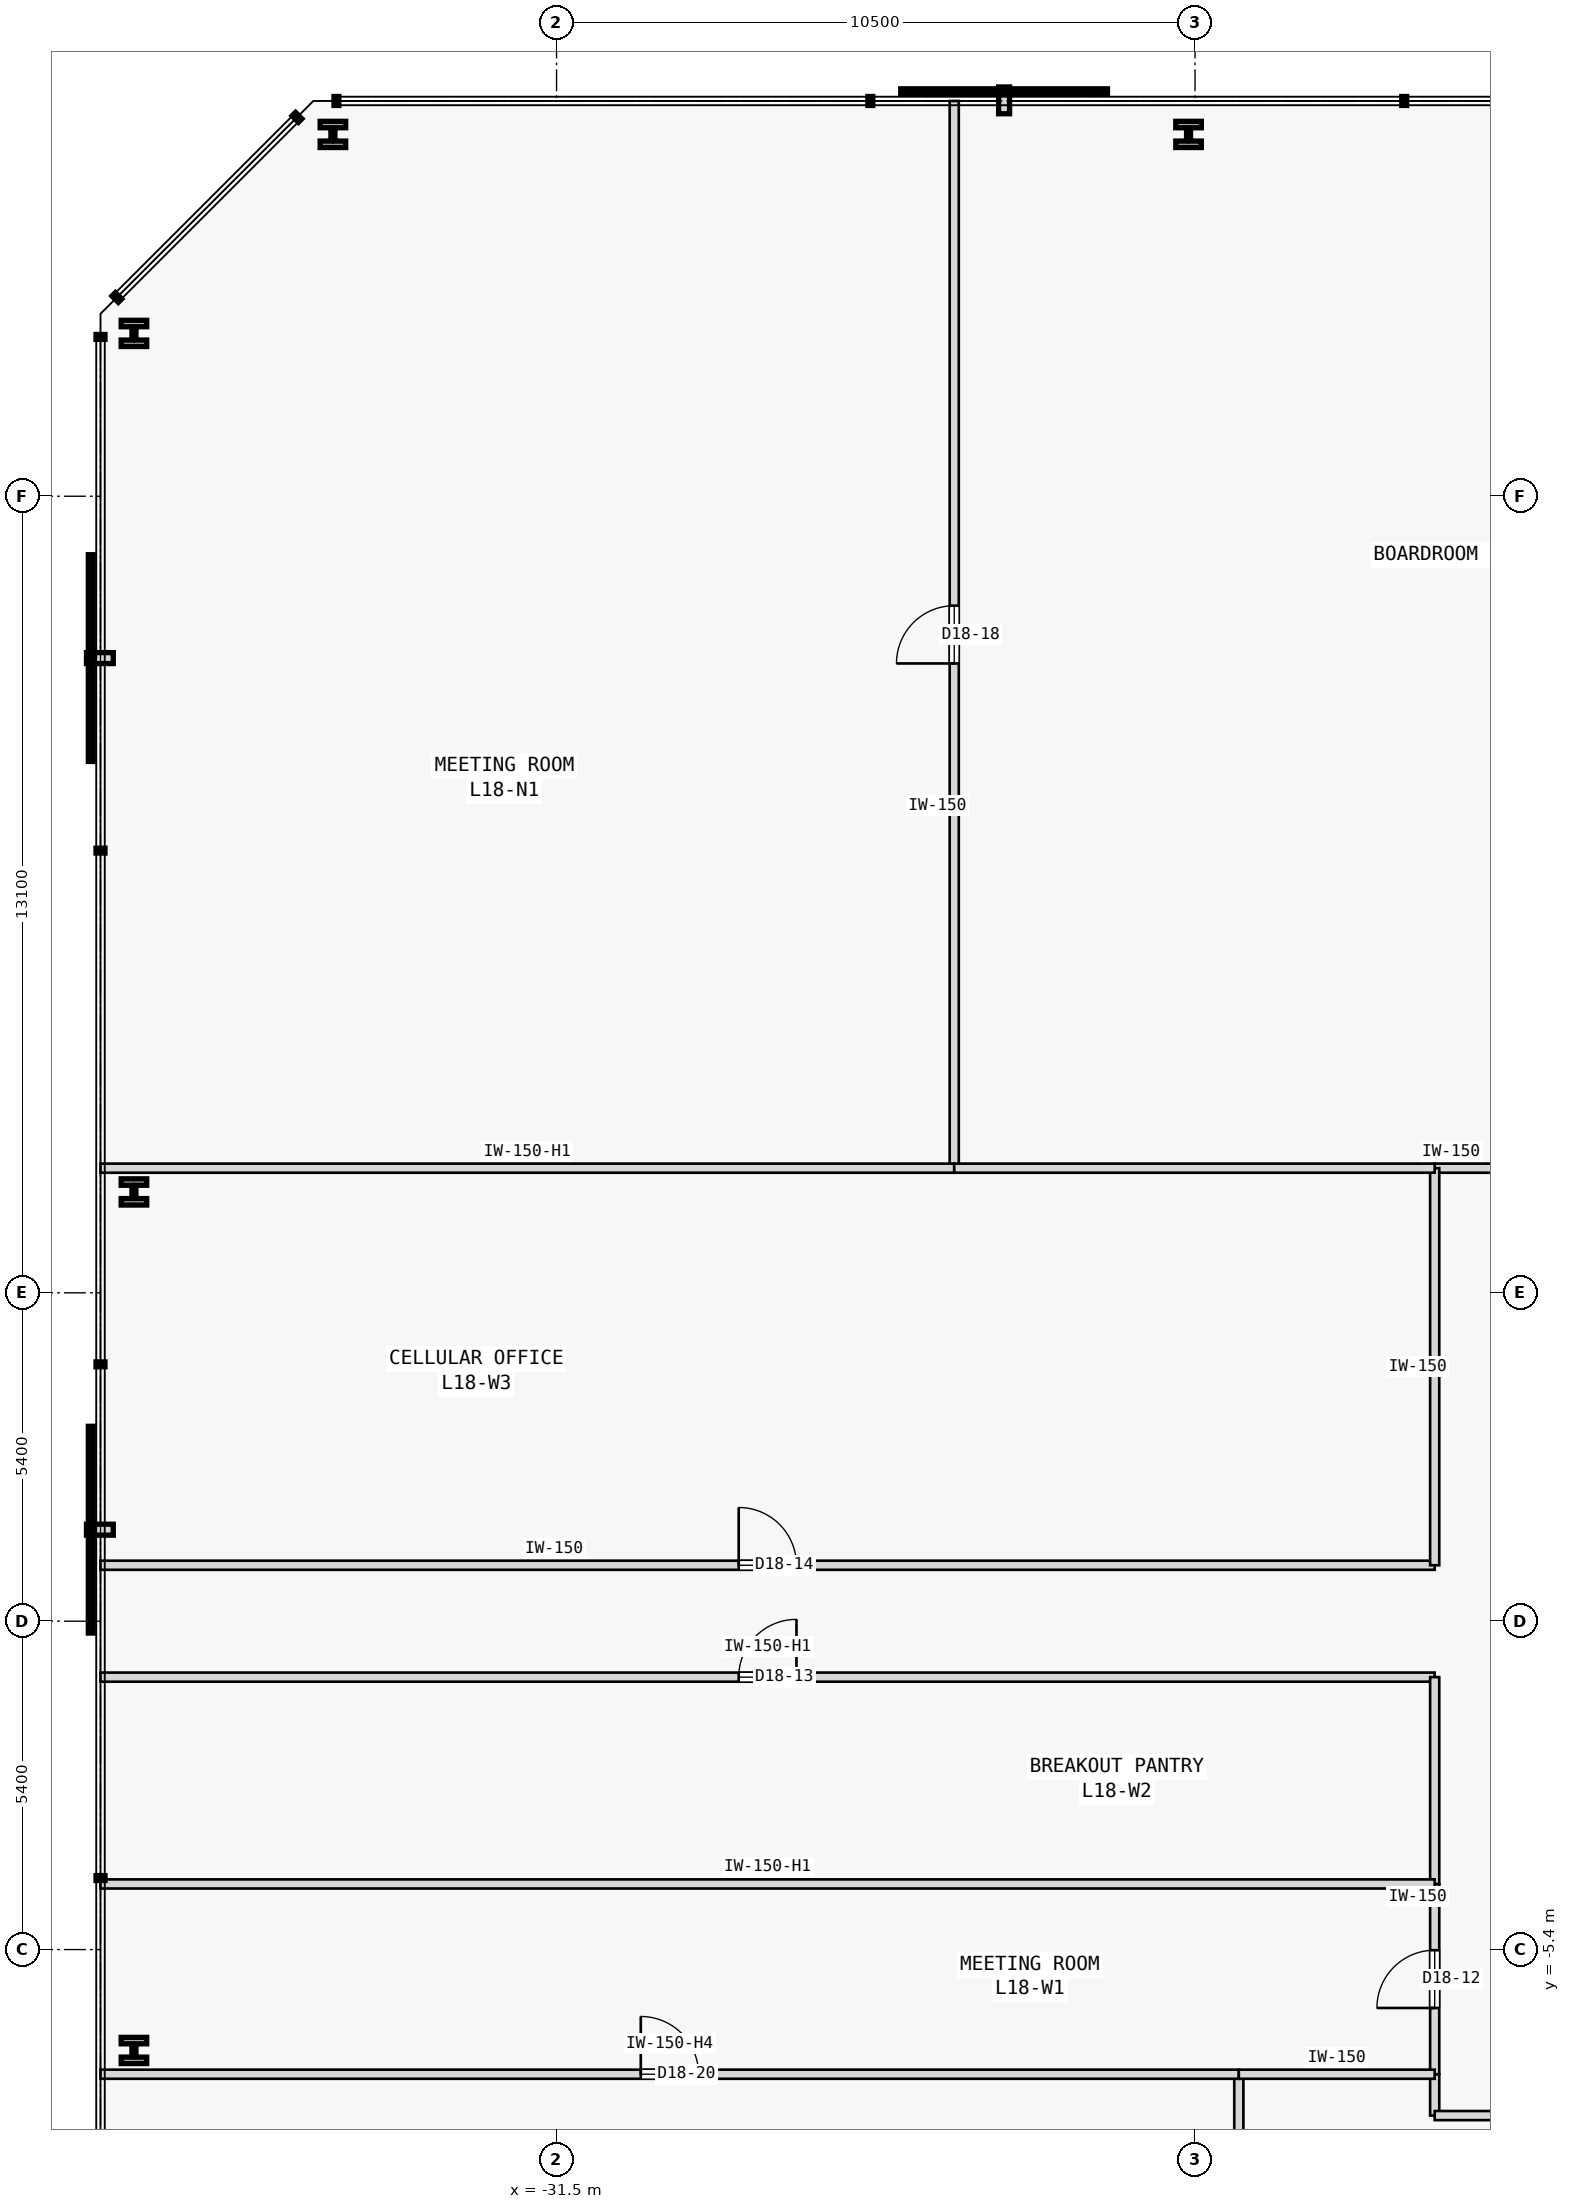
"""IFC4 building model, lengths in metres.
Left out: names, types, materials, properties, quantities, classifications, styles, units other than length and angle.
Written with IfcOpenShell. Run it as: python <this file> out.ifc"""

import sys

from ifc_helpers import new_model, si_unit, direction, frame, frame_2d, origin, origin_2d, place, context, subcontext, project, spatial, rectangle, i_section, extrude, element, fill, save


model = new_model("IFC4")
c1 = context("Model", 3, precision=1e-05, world=origin(), true_north=direction((0.0, 1.0)))
c2 = subcontext(c1, "Body", "Model", "MODEL_VIEW")
j1 = project(units=[si_unit("LENGTHUNIT", "METRE"), si_unit("PLANEANGLEUNIT", "RADIAN")], contexts=[c1])
p1 = place(None, origin())
s1 = spatial("IfcSite", under=j1, at=p1, CompositionType="ELEMENT")
p2 = place(p1, origin())
s2 = spatial("IfcBuilding", under=s1, at=p2, CompositionType="ELEMENT")
p3 = place(p2, frame((0.0, 0.0, 75.0)))
s3 = spatial("IfcBuildingStorey", under=s2, at=p3, CompositionType="ELEMENT", Elevation=75.0)
for number, where, z_axis, x_axis in (
    (1, (-21.107, 24.45, 0.0), (0.0, 0.0, 1.0), (1.0, 0.0, 0.0)),
    (2, (-35.178, 24.45, 0.0), (0.0, 0.0, 1.0), (1.0, 0.0, 0.0)),
    (3, (-38.45, 21.178, 0.0), (0.0, 0.0, 1.0), (1.0, 0.0, 0.0)),
    (4, (-38.45, 7.059, 0.0), (0.0, 0.0, 1.0), (1.0, 0.0, 0.0)),
    (5, (-38.45, -7.059, 0.0), (0.0, 0.0, 1.0), (1.0, 0.0, 0.0)),
):
    element("IfcColumn", number, at=place(p3, frame(where, z_axis=z_axis, x_axis=x_axis)), inside=s3, PredefinedType="COLUMN", context=c2, shape_type="SweptSolid", body=[
        extrude(i_section(OverallWidth=0.42, OverallDepth=0.431, WebThickness=0.065, FlangeThickness=0.106, FilletRadius=0.015, at=origin_2d()), origin(), (0.0, 0.0, 1.0), 3.8),
    ])
p4 = place(p3, frame((-17.059, 7.45, 0.0), z_axis=(0.0, 0.0, 1.0), x_axis=(1.0, 0.0, 0.0)))
e6 = element("IfcWall", 6, at=p4, inside=s3, PredefinedType="PARTITIONING", context=c2, shape_type="SweptSolid", body=[
    extrude(rectangle(XDim=7.699, YDim=0.15, at=frame_2d((3.85, 0.0))), origin(), (0.0, 0.0, 1.0), 3.4),
])
p5 = place(p4, frame((3.375, 0.0, 0.0)))
e7 = element("IfcOpeningElement", 7, at=p5, cuts=e6, PredefinedType="OPENING", context=c2, shape_type="SweptSolid", body=[
    extrude(rectangle(XDim=0.95, YDim=2.15, at=frame_2d((0.475, 1.075))), frame((0.0, 0.085, 0.0), z_axis=(0.0, -1.0, 0.0), x_axis=(1.0, 0.0, 0.0)), (0.0, 0.0, 1.0), 0.17),
])
p6 = place(p3, frame((-17.059, -8.13, 0.0), z_axis=(0.0, 0.0, 1.0), x_axis=(0.0, 1.0, 0.0)))
e8 = element("IfcWall", 8, at=p6, inside=s3, PredefinedType="PARTITIONING", context=c2, shape_type="SweptSolid", body=[
    extrude(rectangle(XDim=0.68, YDim=0.15, at=frame_2d((0.34, 0.0))), origin(), (0.0, 0.0, 1.0), 3.4),
])
p7 = place(p3, frame((-17.059, -8.13, 0.0), z_axis=(0.0, 0.0, 1.0), x_axis=(1.0, 0.0, 0.0)))
e9 = element("IfcWall", 9, at=p7, inside=s3, PredefinedType="PARTITIONING", context=c2, shape_type="SweptSolid", body=[
    extrude(rectangle(XDim=16.139, YDim=0.15, at=frame_2d((8.07, 0.0))), origin(), (0.0, 0.0, 1.0), 3.4),
])
p8 = place(p3, frame((-17.059, -7.45, 0.0), z_axis=(0.0, 0.0, 1.0), x_axis=(0.0, 1.0, 0.0)))
e10 = element("IfcWall", 10, at=p8, inside=s3, PredefinedType="PARTITIONING", context=c2, shape_type="SweptSolid", body=[
    extrude(rectangle(XDim=3.129, YDim=0.15, at=frame_2d((1.564, 0.0))), origin(), (0.0, 0.0, 1.0), 3.4),
])
p9 = place(p8, frame((1.09, 0.0, 0.0)))
e11 = element("IfcOpeningElement", 11, at=p9, cuts=e10, PredefinedType="OPENING", context=c2, shape_type="SweptSolid", body=[
    extrude(rectangle(XDim=0.95, YDim=2.15, at=frame_2d((0.475, 1.075))), frame((0.0, 0.085, 0.0), z_axis=(0.0, -1.0, 0.0), x_axis=(1.0, 0.0, 0.0)), (0.0, 0.0, 1.0), 0.17),
])
p10 = place(p3, frame((-39.0, -0.92, 0.0), z_axis=(0.0, 0.0, 1.0), x_axis=(1.0, 0.0, 0.0)))
e12 = element("IfcWall", 12, at=p10, inside=s3, PredefinedType="PARTITIONING", context=c2, shape_type="SweptSolid", body=[
    extrude(rectangle(XDim=21.941, YDim=0.15, at=frame_2d((10.97, 0.0))), origin(), (0.0, 0.0, 1.0), 2.95),
])
p11 = place(p10, frame((10.496, 0.0, 0.0)))
e13 = element("IfcOpeningElement", 13, at=p11, cuts=e12, PredefinedType="OPENING", context=c2, shape_type="SweptSolid", body=[
    extrude(rectangle(XDim=0.95, YDim=2.15, at=frame_2d((0.475, 1.075))), frame((0.0, 0.085, 0.0), z_axis=(0.0, -1.0, 0.0), x_axis=(1.0, 0.0, 0.0)), (0.0, 0.0, 1.0), 0.17),
])
p12 = place(p3, frame((-17.059, -4.321, 0.0), z_axis=(0.0, 0.0, 1.0), x_axis=(0.0, 1.0, 0.0)))
e14 = element("IfcWall", 14, at=p12, inside=s3, PredefinedType="PARTITIONING", context=c2, shape_type="SweptSolid", body=[
    extrude(rectangle(XDim=3.401, YDim=0.15, at=frame_2d((1.701, 0.0))), origin(), (0.0, 0.0, 1.0), 3.4),
])
p13 = place(p3, frame((-39.0, 0.92, 0.0), z_axis=(0.0, 0.0, 1.0), x_axis=(1.0, 0.0, 0.0)))
e15 = element("IfcWall", 15, at=p13, inside=s3, PredefinedType="PARTITIONING", context=c2, shape_type="SweptSolid", body=[
    extrude(rectangle(XDim=21.941, YDim=0.15, at=frame_2d((10.97, 0.0))), origin(), (0.0, 0.0, 1.0), 3.4),
])
p14 = place(p13, frame((10.496, 0.0, 0.0)))
e16 = element("IfcOpeningElement", 16, at=p14, cuts=e15, PredefinedType="OPENING", context=c2, shape_type="SweptSolid", body=[
    extrude(rectangle(XDim=0.95, YDim=2.15, at=frame_2d((0.475, 1.075))), frame((0.0, 0.085, 0.0), z_axis=(0.0, -1.0, 0.0), x_axis=(1.0, 0.0, 0.0)), (0.0, 0.0, 1.0), 0.17),
])
p15 = place(p3, frame((-17.059, 0.92, 0.0), z_axis=(0.0, 0.0, 1.0), x_axis=(0.0, 1.0, 0.0)))
e17 = element("IfcWall", 17, at=p15, inside=s3, PredefinedType="PARTITIONING", context=c2, shape_type="SweptSolid", body=[
    extrude(rectangle(XDim=6.53, YDim=0.15, at=frame_2d((3.265, 0.0))), origin(), (0.0, 0.0, 1.0), 3.4),
])
p16 = place(p3, frame((-24.96, 7.45, 0.0), z_axis=(0.0, 0.0, 1.0), x_axis=(0.0, 1.0, 0.0)))
e18 = element("IfcWall", 18, at=p16, inside=s3, PredefinedType="PARTITIONING", context=c2, shape_type="SweptSolid", body=[
    extrude(rectangle(XDim=17.55, YDim=0.15, at=frame_2d((8.775, 0.0))), origin(), (0.0, 0.0, 1.0), 3.4),
])
p17 = place(p16, frame((8.3, 0.0, 0.0)))
e19 = element("IfcOpeningElement", 19, at=p17, cuts=e18, PredefinedType="OPENING", context=c2, shape_type="SweptSolid", body=[
    extrude(rectangle(XDim=0.95, YDim=2.15, at=frame_2d((0.475, 1.075))), frame((0.0, 0.085, 0.0), z_axis=(0.0, -1.0, 0.0), x_axis=(1.0, 0.0, 0.0)), (0.0, 0.0, 1.0), 0.17),
])
p18 = place(p3, frame((-39.0, 7.45, 0.0), z_axis=(0.0, 0.0, 1.0), x_axis=(1.0, 0.0, 0.0)))
e20 = element("IfcWall", 20, at=p18, inside=s3, PredefinedType="PARTITIONING", context=c2, shape_type="SweptSolid", body=[
    extrude(rectangle(XDim=14.04, YDim=0.15, at=frame_2d((7.02, 0.0))), origin(), (0.0, 0.0, 1.0), 2.95),
])
p19 = place(p3, frame((-24.96, 7.45, 0.0), z_axis=(0.0, 0.0, 1.0), x_axis=(1.0, 0.0, 0.0)))
e21 = element("IfcWall", 21, at=p19, inside=s3, PredefinedType="PARTITIONING", context=c2, shape_type="SweptSolid", body=[
    extrude(rectangle(XDim=7.901, YDim=0.15, at=frame_2d((3.95, 0.0))), origin(), (0.0, 0.0, 1.0), 3.4),
])
p20 = place(p3, frame((-20.28, -25.0, 0.0), z_axis=(0.0, 0.0, 1.0), x_axis=(0.0, 1.0, 0.0)))
e22 = element("IfcWall", 22, at=p20, inside=s3, PredefinedType="PARTITIONING", context=c2, shape_type="SweptSolid", body=[
    extrude(rectangle(XDim=17.55, YDim=0.15, at=frame_2d((8.775, 0.0))), origin(), (0.0, 0.0, 1.0), 3.4),
])
p21 = place(p3, frame((-39.0, -7.45, 0.0), z_axis=(0.0, 0.0, 1.0), x_axis=(1.0, 0.0, 0.0)))
e23 = element("IfcWall", 23, at=p21, inside=s3, PredefinedType="PARTITIONING", context=c2, shape_type="SweptSolid", body=[
    extrude(rectangle(XDim=18.72, YDim=0.15, at=frame_2d((9.36, 0.0))), origin(), (0.0, 0.0, 1.0), 2.34),
])
p22 = place(p21, frame((8.885, 0.0, 0.0)))
e24 = element("IfcOpeningElement", 24, at=p22, cuts=e23, PredefinedType="OPENING", context=c2, shape_type="SweptSolid", body=[
    extrude(rectangle(XDim=0.95, YDim=2.15, at=frame_2d((0.475, 1.075))), frame((0.0, 0.085, 0.0), z_axis=(0.0, -1.0, 0.0), x_axis=(1.0, 0.0, 0.0)), (0.0, 0.0, 1.0), 0.17),
])
p23 = place(p3, frame((-20.28, -7.45, 0.0), z_axis=(0.0, 0.0, 1.0), x_axis=(1.0, 0.0, 0.0)))
e25 = element("IfcWall", 25, at=p23, inside=s3, PredefinedType="PARTITIONING", context=c2, shape_type="SweptSolid", body=[
    extrude(rectangle(XDim=3.221, YDim=0.15, at=frame_2d((1.61, 0.0))), origin(), (0.0, 0.0, 1.0), 3.4),
])
p24 = place(p3, frame((-39.0, -4.321, 0.0), z_axis=(0.0, 0.0, 1.0), x_axis=(1.0, 0.0, 0.0)))
e26 = element("IfcWall", 26, at=p24, inside=s3, PredefinedType="PARTITIONING", context=c2, shape_type="SweptSolid", body=[
    extrude(rectangle(XDim=21.941, YDim=0.15, at=frame_2d((10.97, 0.0))), origin(), (0.0, 0.0, 1.0), 2.95),
])
p25 = place(p9, origin())
e27 = element("IfcDoor", 27, at=p25, inside=s3, OperationType="SINGLE_SWING_LEFT", PredefinedType="DOOR", context=c2, shape_type="SweptSolid", body=[
    extrude(rectangle(XDim=0.95, YDim=2.15, at=frame_2d((0.475, 1.075))), frame((0.0, 0.025, 0.0), z_axis=(0.0, -1.0, 0.0), x_axis=(1.0, 0.0, 0.0)), (0.0, 0.0, 1.0), 0.05),
])
fill(e11, e27)
p26 = place(p11, origin())
e28 = element("IfcDoor", 28, at=p26, inside=s3, OperationType="SINGLE_SWING_RIGHT", PredefinedType="DOOR", context=c2, shape_type="SweptSolid", body=[
    extrude(rectangle(XDim=0.95, YDim=2.15, at=frame_2d((0.475, 1.075))), frame((0.0, 0.025, 0.0), z_axis=(0.0, -1.0, 0.0), x_axis=(1.0, 0.0, 0.0)), (0.0, 0.0, 1.0), 0.05),
])
fill(e13, e28)
p27 = place(p14, origin())
e29 = element("IfcDoor", 29, at=p27, inside=s3, OperationType="SINGLE_SWING_LEFT", PredefinedType="DOOR", context=c2, shape_type="SweptSolid", body=[
    extrude(rectangle(XDim=0.95, YDim=2.15, at=frame_2d((0.475, 1.075))), frame((0.0, 0.025, 0.0), z_axis=(0.0, -1.0, 0.0), x_axis=(1.0, 0.0, 0.0)), (0.0, 0.0, 1.0), 0.05),
])
fill(e16, e29)
p28 = place(p17, origin())
e30 = element("IfcDoor", 30, at=p28, inside=s3, OperationType="SINGLE_SWING_LEFT", PredefinedType="DOOR", context=c2, shape_type="SweptSolid", body=[
    extrude(rectangle(XDim=0.95, YDim=2.15, at=frame_2d((0.475, 1.075))), frame((0.0, 0.025, 0.0), z_axis=(0.0, -1.0, 0.0), x_axis=(1.0, 0.0, 0.0)), (0.0, 0.0, 1.0), 0.05),
])
fill(e19, e30)
p29 = place(p22, origin())
e31 = element("IfcDoor", 31, at=p29, inside=s3, OperationType="SINGLE_SWING_LEFT", PredefinedType="DOOR", context=c2, shape_type="SweptSolid", body=[
    extrude(rectangle(XDim=0.95, YDim=2.15, at=frame_2d((0.475, 1.075))), frame((0.0, 0.025, 0.0), z_axis=(0.0, -1.0, 0.0), x_axis=(1.0, 0.0, 0.0)), (0.0, 0.0, 1.0), 0.05),
])
fill(e24, e31)
save(model, sys.argv[1])
